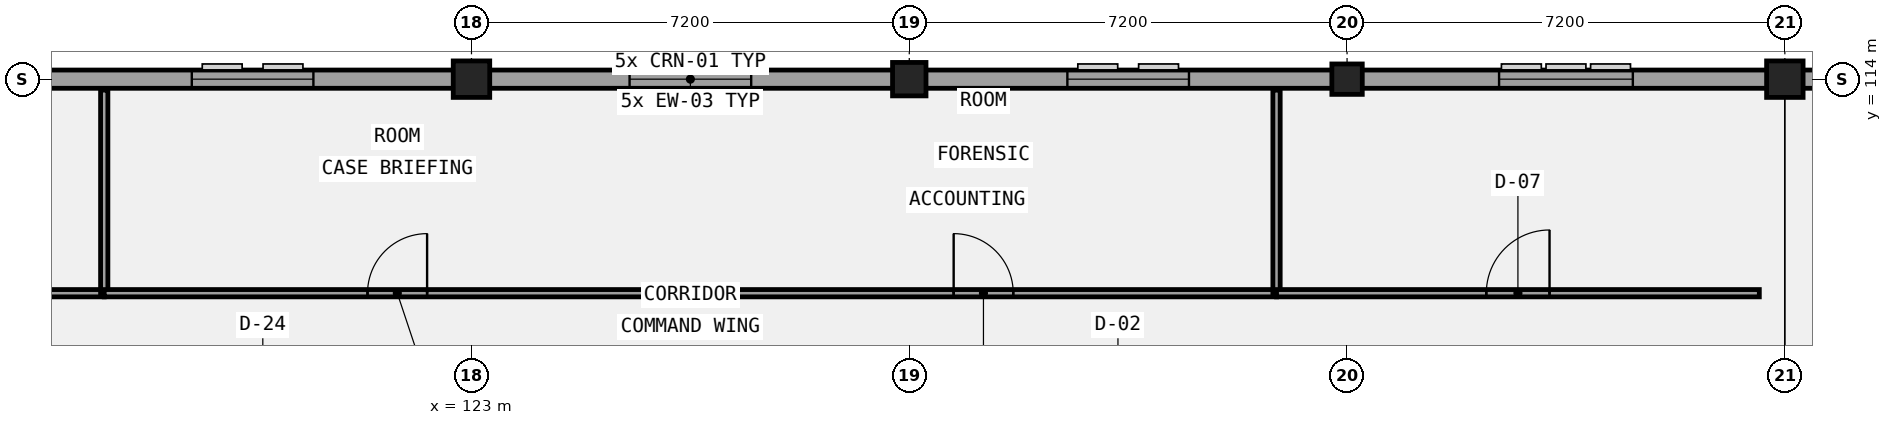
"""IFC4 building model, lengths in metres.
Left out: names, types, materials, properties, quantities, classifications, styles, units other than length and angle.
Written with IfcOpenShell. Run it as: python <this file> out.ifc"""

import sys

from ifc_helpers import new_model, si_unit, direction, frame, frame_2d, origin, origin_2d, place, context, subcontext, project, spatial, rectangle, extrude, element, fill, save


model = new_model("IFC4")
c1 = context("Model", 3, precision=1e-05, world=origin(), true_north=direction((0.0, 1.0)))
c2 = subcontext(c1, "Body", "Model", "MODEL_VIEW")
j1 = project(units=[si_unit("LENGTHUNIT", "METRE"), si_unit("PLANEANGLEUNIT", "RADIAN")], contexts=[c1])
p1 = place(None, origin())
s1 = spatial("IfcSite", under=j1, at=p1, CompositionType="ELEMENT")
p2 = place(p1, origin())
s2 = spatial("IfcBuilding", under=s1, at=p2, CompositionType="ELEMENT")
p3 = place(p2, frame((0.0, 0.0, 18.0)))
s3 = spatial("IfcBuildingStorey", under=s2, at=p3, CompositionType="ELEMENT", Elevation=18.0)
p4 = place(p3, frame((123.0, 114.0, 0.0), z_axis=(0.0, 0.0, 1.0), x_axis=(1.0, 0.0, 0.0)))
e1 = element("IfcColumn", 1, at=p4, inside=s3, PredefinedType="COLUMN", context=c2, shape_type="SweptSolid", body=[
    extrude(rectangle(XDim=0.6, YDim=0.6, at=origin_2d()), origin(), (0.0, 0.0, 1.0), 4.2),
])
p5 = place(p3, frame((130.2, 114.0, 0.0), z_axis=(0.0, 0.0, 1.0), x_axis=(1.0, 0.0, 0.0)))
e2 = element("IfcColumn", 2, at=p5, inside=s3, PredefinedType="COLUMN", context=c2, shape_type="SweptSolid", body=[
    extrude(rectangle(XDim=0.55, YDim=0.55, at=origin_2d()), origin(), (0.0, 0.0, 1.0), 4.2),
])
p6 = place(p3, frame((137.4, 114.0, 0.0), z_axis=(0.0, 0.0, 1.0), x_axis=(1.0, 0.0, 0.0)))
e3 = element("IfcColumn", 3, at=p6, inside=s3, PredefinedType="COLUMN", context=c2, shape_type="SweptSolid", body=[
    extrude(rectangle(XDim=0.5, YDim=0.5, at=origin_2d()), origin(), (0.0, 0.0, 1.0), 4.2),
])
p7 = place(p3, frame((144.6, 114.0, 0.0), z_axis=(0.0, 0.0, 1.0), x_axis=(1.0, 0.0, 0.0)))
e4 = element("IfcColumn", 4, at=p7, inside=s3, PredefinedType="COLUMN", context=c2, shape_type="SweptSolid", body=[
    extrude(rectangle(XDim=0.6, YDim=0.6, at=origin_2d()), origin(), (0.0, 0.0, 1.0), 4.2),
])
p8 = place(p3, frame((166.35, 114.0, 0.0), z_axis=(0.0, 0.0, 1.0), x_axis=(-1.0, 0.0, 0.0)))
e5 = element("IfcWall", 5, at=p8, inside=s3, PredefinedType="SOLIDWALL", context=c2, shape_type="SweptSolid", body=[
    extrude(rectangle(XDim=21.9, YDim=0.3, at=frame_2d((10.95, 0.0))), origin(), (0.0, 0.0, 1.0), 3.19),
])
p9 = place(p8, frame((17.25, 0.0, 0.95)))
e6 = element("IfcOpeningElement", 6, at=p9, cuts=e5, PredefinedType="OPENING", context=c2, shape_type="SweptSolid", body=[
    extrude(rectangle(XDim=1.8, YDim=1.9, at=frame_2d((0.9, 0.95))), frame((0.0, 0.16, 0.0), z_axis=(0.0, -1.0, 0.0), x_axis=(1.0, 0.0, 0.0)), (0.0, 0.0, 1.0), 0.32),
])
p10 = place(p8, frame((9.95, 0.0, 0.95)))
e7 = element("IfcOpeningElement", 7, at=p10, cuts=e5, PredefinedType="OPENING", context=c2, shape_type="SweptSolid", body=[
    extrude(rectangle(XDim=2.0, YDim=1.4, at=frame_2d((1.0, 0.7))), frame((0.0, 0.16, 0.0), z_axis=(0.0, -1.0, 0.0), x_axis=(1.0, 0.0, 0.0)), (0.0, 0.0, 1.0), 0.32),
])
p11 = place(p8, frame((2.75, 0.0, 0.95)))
e8 = element("IfcOpeningElement", 8, at=p11, cuts=e5, PredefinedType="OPENING", context=c2, shape_type="SweptSolid", body=[
    extrude(rectangle(XDim=2.0, YDim=1.65, at=frame_2d((1.0, 0.825))), frame((0.0, 0.16, 0.0), z_axis=(0.0, -1.0, 0.0), x_axis=(1.0, 0.0, 0.0)), (0.0, 0.0, 1.0), 0.32),
])
p12 = place(p3, frame((144.75, 114.0, 0.0), z_axis=(0.0, 0.0, 1.0), x_axis=(-1.0, 0.0, 0.0)))
e9 = element("IfcWall", 9, at=p12, inside=s3, PredefinedType="SOLIDWALL", context=c2, shape_type="SweptSolid", body=[
    extrude(rectangle(XDim=36.3, YDim=0.3, at=frame_2d((18.15, 0.0))), origin(), (0.0, 0.0, 1.0), 3.19),
])
p13 = place(p12, frame((31.65, 0.0, 0.95)))
e10 = element("IfcOpeningElement", 10, at=p13, cuts=e9, PredefinedType="OPENING", context=c2, shape_type="SweptSolid", body=[
    extrude(rectangle(XDim=1.8, YDim=1.9, at=frame_2d((0.9, 0.95))), frame((0.0, 0.16, 0.0), z_axis=(0.0, -1.0, 0.0), x_axis=(1.0, 0.0, 0.0)), (0.0, 0.0, 1.0), 0.32),
])
p14 = place(p12, frame((24.35, 0.0, 0.95)))
e11 = element("IfcOpeningElement", 11, at=p14, cuts=e9, PredefinedType="OPENING", context=c2, shape_type="SweptSolid", body=[
    extrude(rectangle(XDim=2.0, YDim=1.4, at=frame_2d((1.0, 0.7))), frame((0.0, 0.16, 0.0), z_axis=(0.0, -1.0, 0.0), x_axis=(1.0, 0.0, 0.0)), (0.0, 0.0, 1.0), 0.32),
])
p15 = place(p12, frame((17.15, 0.0, 0.95)))
e12 = element("IfcOpeningElement", 12, at=p15, cuts=e9, PredefinedType="OPENING", context=c2, shape_type="SweptSolid", body=[
    extrude(rectangle(XDim=2.0, YDim=1.65, at=frame_2d((1.0, 0.825))), frame((0.0, 0.16, 0.0), z_axis=(0.0, -1.0, 0.0), x_axis=(1.0, 0.0, 0.0)), (0.0, 0.0, 1.0), 0.32),
])
p16 = place(p12, frame((9.95, 0.0, 0.95)))
e13 = element("IfcOpeningElement", 13, at=p16, cuts=e9, PredefinedType="OPENING", context=c2, shape_type="SweptSolid", body=[
    extrude(rectangle(XDim=2.0, YDim=1.9, at=frame_2d((1.0, 0.95))), frame((0.0, 0.16, 0.0), z_axis=(0.0, -1.0, 0.0), x_axis=(1.0, 0.0, 0.0)), (0.0, 0.0, 1.0), 0.32),
])
p17 = place(p12, frame((2.65, 0.0, 0.95)))
e14 = element("IfcOpeningElement", 14, at=p17, cuts=e9, PredefinedType="OPENING", context=c2, shape_type="SweptSolid", body=[
    extrude(rectangle(XDim=2.2, YDim=1.4, at=frame_2d((1.1, 0.7))), frame((0.0, 0.16, 0.0), z_axis=(0.0, -1.0, 0.0), x_axis=(1.0, 0.0, 0.0)), (0.0, 0.0, 1.0), 0.32),
])
p18 = place(p3, frame((109.02, 110.48, 0.0), z_axis=(0.0, 0.0, 1.0), x_axis=(1.0, 0.0, 0.0)))
e15 = element("IfcWall", 15, at=p18, inside=s3, PredefinedType="PARTITIONING", context=c2, shape_type="SweptSolid", body=[
    extrude(rectangle(XDim=7.94, YDim=0.12, at=frame_2d((3.97, 0.0))), origin(), (0.0, 0.0, 1.0), 3.39),
])
p19 = place(p18, frame((3.48, 0.0, 0.0)))
e16 = element("IfcOpeningElement", 16, at=p19, cuts=e15, PredefinedType="OPENING", context=c2, shape_type="SweptSolid", body=[
    extrude(rectangle(XDim=0.98, YDim=2.1, at=frame_2d((0.49, 1.05))), frame((0.0, 0.07, 0.0), z_axis=(0.0, -1.0, 0.0), x_axis=(1.0, 0.0, 0.0)), (0.0, 0.0, 1.0), 0.14),
])
p20 = place(p3, frame((116.96, 110.48, 0.0), z_axis=(0.0, 0.0, 1.0), x_axis=(0.0, 1.0, 0.0)))
e17 = element("IfcWall", 17, at=p20, inside=s3, PredefinedType="PARTITIONING", context=c2, shape_type="SweptSolid", body=[
    extrude(rectangle(XDim=3.34, YDim=0.12, at=frame_2d((1.67, 0.0))), origin(), (0.0, 0.0, 1.0), 3.94),
])
p21 = place(p3, frame((116.96, 110.48, 0.0), z_axis=(0.0, 0.0, 1.0), x_axis=(1.0, 0.0, 0.0)))
e18 = element("IfcWall", 18, at=p21, inside=s3, PredefinedType="PARTITIONING", context=c2, shape_type="SweptSolid", body=[
    extrude(rectangle(XDim=9.64, YDim=0.12, at=frame_2d((4.82, 0.0))), origin(), (0.0, 0.0, 1.0), 3.39),
])
p22 = place(p21, frame((4.33, 0.0, 0.0)))
e19 = element("IfcOpeningElement", 19, at=p22, cuts=e18, PredefinedType="OPENING", context=c2, shape_type="SweptSolid", body=[
    extrude(rectangle(XDim=0.98, YDim=2.22, at=frame_2d((0.49, 1.11))), frame((0.0, 0.07, 0.0), z_axis=(0.0, -1.0, 0.0), x_axis=(1.0, 0.0, 0.0)), (0.0, 0.0, 1.0), 0.14),
])
p23 = place(p3, frame((126.6, 110.48, 0.0), z_axis=(0.0, 0.0, 1.0), x_axis=(1.0, 0.0, 0.0)))
e20 = element("IfcWall", 20, at=p23, inside=s3, PredefinedType="PARTITIONING", context=c2, shape_type="SweptSolid", body=[
    extrude(rectangle(XDim=9.64, YDim=0.12, at=frame_2d((4.82, 0.0))), origin(), (0.0, 0.0, 1.0), 3.39),
])
p24 = place(p23, frame((4.33, 0.0, 0.0)))
e21 = element("IfcOpeningElement", 21, at=p24, cuts=e20, PredefinedType="OPENING", context=c2, shape_type="SweptSolid", body=[
    extrude(rectangle(XDim=0.98, YDim=2.35, at=frame_2d((0.49, 1.175))), frame((0.0, 0.07, 0.0), z_axis=(0.0, -1.0, 0.0), x_axis=(1.0, 0.0, 0.0)), (0.0, 0.0, 1.0), 0.14),
])
p25 = place(p3, frame((136.24, 110.48, 0.0), z_axis=(0.0, 0.0, 1.0), x_axis=(0.0, 1.0, 0.0)))
e22 = element("IfcWall", 22, at=p25, inside=s3, PredefinedType="PARTITIONING", context=c2, shape_type="SweptSolid", body=[
    extrude(rectangle(XDim=3.34, YDim=0.12, at=frame_2d((1.67, 0.0))), origin(), (0.0, 0.0, 1.0), 3.94),
])
p26 = place(p3, frame((136.24, 110.48, 0.0), z_axis=(0.0, 0.0, 1.0), x_axis=(1.0, 0.0, 0.0)))
e23 = element("IfcWall", 23, at=p26, inside=s3, PredefinedType="PARTITIONING", context=c2, shape_type="SweptSolid", body=[
    extrude(rectangle(XDim=7.94, YDim=0.12, at=frame_2d((3.97, 0.0))), origin(), (0.0, 0.0, 1.0), 3.39),
])
p27 = place(p26, frame((3.45, 0.0, 0.0)))
e24 = element("IfcOpeningElement", 24, at=p27, cuts=e23, PredefinedType="OPENING", context=c2, shape_type="SweptSolid", body=[
    extrude(rectangle(XDim=1.04, YDim=2.1, at=frame_2d((0.52, 1.05))), frame((0.0, 0.07, 0.0), z_axis=(0.0, -1.0, 0.0), x_axis=(1.0, 0.0, 0.0)), (0.0, 0.0, 1.0), 0.14),
])
p28 = place(p14, origin())
e25 = element("IfcWindow", 25, at=p28, inside=s3, PartitioningType="SINGLE_PANEL", PredefinedType="WINDOW", context=c2, shape_type="SweptSolid", body=[
    extrude(rectangle(XDim=2.0, YDim=1.4, at=frame_2d((1.0, 0.7))), frame((0.0, 0.03, 0.0), z_axis=(0.0, -1.0, 0.0), x_axis=(1.0, 0.0, 0.0)), (0.0, 0.0, 1.0), 0.06),
])
fill(e11, e25)
p29 = place(p15, origin())
e26 = element("IfcWindow", 26, at=p29, inside=s3, PartitioningType="SINGLE_PANEL", PredefinedType="WINDOW", context=c2, shape_type="SweptSolid", body=[
    extrude(rectangle(XDim=2.0, YDim=1.65, at=frame_2d((1.0, 0.825))), frame((0.0, 0.03, 0.0), z_axis=(0.0, -1.0, 0.0), x_axis=(1.0, 0.0, 0.0)), (0.0, 0.0, 1.0), 0.06),
])
fill(e12, e26)
p30 = place(p16, origin())
e27 = element("IfcWindow", 27, at=p30, inside=s3, PartitioningType="SINGLE_PANEL", PredefinedType="WINDOW", context=c2, shape_type="SweptSolid", body=[
    extrude(rectangle(XDim=2.0, YDim=1.9, at=frame_2d((1.0, 0.95))), frame((0.0, 0.03, 0.0), z_axis=(0.0, -1.0, 0.0), x_axis=(1.0, 0.0, 0.0)), (0.0, 0.0, 1.0), 0.06),
])
fill(e13, e27)
p31 = place(p17, origin())
e28 = element("IfcWindow", 28, at=p31, inside=s3, PartitioningType="SINGLE_PANEL", PredefinedType="WINDOW", context=c2, shape_type="SweptSolid", body=[
    extrude(rectangle(XDim=2.2, YDim=1.4, at=frame_2d((1.1, 0.7))), frame((0.0, 0.03, 0.0), z_axis=(0.0, -1.0, 0.0), x_axis=(1.0, 0.0, 0.0)), (0.0, 0.0, 1.0), 0.06),
])
fill(e14, e28)
p32 = place(p22, origin())
e29 = element("IfcDoor", 29, at=p32, inside=s3, OperationType="SINGLE_SWING_RIGHT", PredefinedType="DOOR", context=c2, shape_type="SweptSolid", body=[
    extrude(rectangle(XDim=0.98, YDim=2.22, at=frame_2d((0.49, 1.11))), frame((0.0, 0.025, 0.0), z_axis=(0.0, -1.0, 0.0), x_axis=(1.0, 0.0, 0.0)), (0.0, 0.0, 1.0), 0.05),
])
fill(e19, e29)
p33 = place(p24, origin())
e30 = element("IfcDoor", 30, at=p33, inside=s3, OperationType="SINGLE_SWING_LEFT", PredefinedType="DOOR", context=c2, shape_type="SweptSolid", body=[
    extrude(rectangle(XDim=0.98, YDim=2.35, at=frame_2d((0.49, 1.175))), frame((0.0, 0.025, 0.0), z_axis=(0.0, -1.0, 0.0), x_axis=(1.0, 0.0, 0.0)), (0.0, 0.0, 1.0), 0.05),
])
fill(e21, e30)
p34 = place(p27, origin())
e31 = element("IfcDoor", 31, at=p34, inside=s3, OperationType="SINGLE_SWING_RIGHT", PredefinedType="DOOR", context=c2, shape_type="SweptSolid", body=[
    extrude(rectangle(XDim=1.04, YDim=2.1, at=frame_2d((0.52, 1.05))), frame((0.0, 0.025, 0.0), z_axis=(0.0, -1.0, 0.0), x_axis=(1.0, 0.0, 0.0)), (0.0, 0.0, 1.0), 0.05),
])
fill(e24, e31)
save(model, sys.argv[1])
